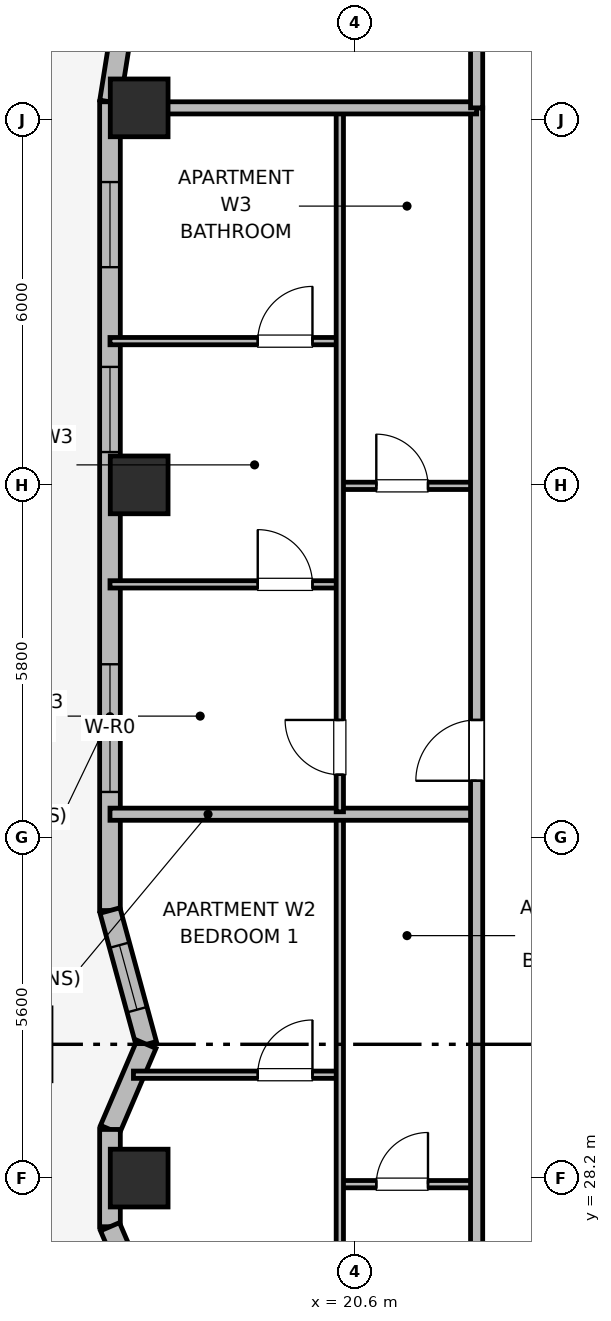
"""IFC4 building model, lengths in metres.
Left out: names, types, materials, properties, quantities, classifications, styles, units other than length and angle.
Written with IfcOpenShell. Run it as: python <this file> out.ifc"""

import sys

from ifc_helpers import new_model, si_unit, direction, frame, frame_2d, origin, origin_2d, place, context, subcontext, project, spatial, rectangle, extrude, element, fill, save


model = new_model("IFC4")
c1 = context("Model", 3, precision=1e-05, world=origin(), true_north=direction((0.0, 1.0)))
c2 = subcontext(c1, "Body", "Model", "MODEL_VIEW")
j1 = project(units=[si_unit("LENGTHUNIT", "METRE"), si_unit("PLANEANGLEUNIT", "RADIAN")], contexts=[c1])
p1 = place(None, origin())
s1 = spatial("IfcSite", under=j1, at=p1, CompositionType="ELEMENT")
p2 = place(p1, origin())
s2 = spatial("IfcBuilding", under=s1, at=p2, CompositionType="ELEMENT")
p3 = place(p2, frame((0.0, 0.0, 143.6)))
s3 = spatial("IfcBuildingStorey", under=s2, at=p3, CompositionType="ELEMENT", Elevation=143.6)
for number, where, z_axis, x_axis in (
    (1, (17.05, 28.2, 0.0), (0.0, 0.0, 1.0), (1.0, 0.0, 0.0)),
    (2, (17.05, 39.6, 0.0), (0.0, 0.0, 1.0), (1.0, 0.0, 0.0)),
    (3, (17.05, 45.8, 0.0), (0.0, 0.0, 1.0), (1.0, 0.0, 0.0)),
):
    element("IfcColumn", number, at=place(p3, frame(where, z_axis=z_axis, x_axis=x_axis)), inside=s3, PredefinedType="COLUMN", context=c2, shape_type="SweptSolid", body=[
        extrude(rectangle(XDim=0.95, YDim=0.95, at=origin_2d()), origin(), (0.0, 0.0, 1.0), 4.2),
    ])
p4 = place(p3, frame((16.748, 47.022, 0.0), z_axis=(0.0, 0.0, 1.0), x_axis=(-0.156481329164, -0.987680916907, 0.0)))
e4 = element("IfcWall", 4, at=p4, inside=s3, PredefinedType="SOLIDWALL", context=c2, shape_type="SweptSolid", body=[
    extrude(rectangle(XDim=1.136, YDim=0.34, at=frame_2d((0.568, 0.0))), origin(), (0.0, 0.0, 1.0), 3.22),
])
p5 = place(p3, frame((16.57, 45.9, 0.0), z_axis=(0.0, 0.0, 1.0), x_axis=(0.0, -1.0, 0.0)))
e5 = element("IfcWall", 5, at=p5, inside=s3, PredefinedType="SOLIDWALL", context=c2, shape_type="SweptSolid", body=[
    extrude(rectangle(XDim=13.3, YDim=0.34, at=frame_2d((6.65, 0.0))), origin(), (0.0, 0.0, 1.0), 3.22),
])
p6 = place(p5, frame((1.32, 0.0, 0.85)))
e6 = element("IfcOpeningElement", 6, at=p6, cuts=e5, PredefinedType="OPENING", context=c2, shape_type="SweptSolid", body=[
    extrude(rectangle(XDim=1.4, YDim=1.85, at=frame_2d((0.7, 0.925))), frame((0.0, 0.18, 0.0), z_axis=(0.0, -1.0, 0.0), x_axis=(1.0, 0.0, 0.0)), (0.0, 0.0, 1.0), 0.36),
])
p7 = place(p5, frame((4.36, 0.0, 0.85)))
e7 = element("IfcOpeningElement", 7, at=p7, cuts=e5, PredefinedType="OPENING", context=c2, shape_type="SweptSolid", body=[
    extrude(rectangle(XDim=1.4, YDim=1.85, at=frame_2d((0.7, 0.925))), frame((0.0, 0.18, 0.0), z_axis=(0.0, -1.0, 0.0), x_axis=(1.0, 0.0, 0.0)), (0.0, 0.0, 1.0), 0.36),
])
p8 = place(p5, frame((9.25, 0.0, 0.8)))
e8 = element("IfcOpeningElement", 8, at=p8, cuts=e5, PredefinedType="OPENING", context=c2, shape_type="SweptSolid", body=[
    extrude(rectangle(XDim=2.1, YDim=1.9, at=frame_2d((1.05, 0.95))), frame((0.0, 0.18, 0.0), z_axis=(0.0, -1.0, 0.0), x_axis=(1.0, 0.0, 0.0)), (0.0, 0.0, 1.0), 0.36),
])
p9 = place(p3, frame((16.57, 32.6, 0.0), z_axis=(0.0, 0.0, 1.0), x_axis=(0.263035877812, -0.96478605244, 0.0)))
e9 = element("IfcWall", 9, at=p9, inside=s3, PredefinedType="SOLIDWALL", context=c2, shape_type="SweptSolid", body=[
    extrude(rectangle(XDim=2.281, YDim=0.34, at=frame_2d((1.14, 0.0))), origin(), (0.0, 0.0, 1.0), 3.22),
])
p10 = place(p9, frame((0.59, 0.0, 0.95)))
e10 = element("IfcOpeningElement", 10, at=p10, cuts=e9, PredefinedType="OPENING", context=c2, shape_type="SweptSolid", body=[
    extrude(rectangle(XDim=1.1, YDim=1.65, at=frame_2d((0.55, 0.825))), frame((0.0, 0.18, 0.0), z_axis=(0.0, -1.0, 0.0), x_axis=(1.0, 0.0, 0.0)), (0.0, 0.0, 1.0), 0.36),
])
p11 = place(p3, frame((17.17, 30.4, 0.0), z_axis=(0.0, 0.0, 1.0), x_axis=(-0.393861257526, -0.919169902586, 0.0)))
e11 = element("IfcWall", 11, at=p11, inside=s3, PredefinedType="SOLIDWALL", context=c2, shape_type="SweptSolid", body=[
    extrude(rectangle(XDim=1.523, YDim=0.34, at=frame_2d((0.761, 0.0))), origin(), (0.0, 0.0, 1.0), 3.22),
])
p12 = place(p3, frame((16.57, 29.0, 0.0), z_axis=(0.0, 0.0, 1.0), x_axis=(0.0, -1.0, 0.0)))
e12 = element("IfcWall", 12, at=p12, inside=s3, PredefinedType="SOLIDWALL", context=c2, shape_type="SweptSolid", body=[
    extrude(rectangle(XDim=1.6, YDim=0.34, at=frame_2d((0.8, 0.0))), origin(), (0.0, 0.0, 1.0), 3.22),
])
p13 = place(p3, frame((16.57, 27.4, 0.0), z_axis=(0.0, 0.0, 1.0), x_axis=(0.393861257526, -0.919169902586, 0.0)))
e13 = element("IfcWall", 13, at=p13, inside=s3, PredefinedType="SOLIDWALL", context=c2, shape_type="SweptSolid", body=[
    extrude(rectangle(XDim=1.523, YDim=0.34, at=frame_2d((0.761, 0.0))), origin(), (0.0, 0.0, 1.0), 3.22),
])
p14 = place(p3, frame((20.35, 28.1, 0.0), z_axis=(0.0, 0.0, 1.0), x_axis=(1.0, 0.0, 0.0)))
e14 = element("IfcWall", 14, at=p14, inside=s3, PredefinedType="PARTITIONING", context=c2, shape_type="SweptSolid", body=[
    extrude(rectangle(XDim=2.25, YDim=0.12, at=frame_2d((1.125, 0.0))), origin(), (0.0, 0.0, 1.0), 3.05),
])
p15 = place(p14, frame((0.6, 0.0, 0.0)))
e15 = element("IfcOpeningElement", 15, at=p15, cuts=e14, PredefinedType="OPENING", context=c2, shape_type="SweptSolid", body=[
    extrude(rectangle(XDim=0.85, YDim=2.1, at=frame_2d((0.425, 1.05))), frame((0.0, 0.07, 0.0), z_axis=(0.0, -1.0, 0.0), x_axis=(1.0, 0.0, 0.0)), (0.0, 0.0, 1.0), 0.14),
])
p16 = place(p3, frame((16.956, 29.9, 0.0), z_axis=(0.0, 0.0, 1.0), x_axis=(1.0, 0.0, 0.0)))
e16 = element("IfcWall", 16, at=p16, inside=s3, PredefinedType="PARTITIONING", context=c2, shape_type="SweptSolid", body=[
    extrude(rectangle(XDim=3.394, YDim=0.12, at=frame_2d((1.697, 0.0))), origin(), (0.0, 0.0, 1.0), 3.05),
])
p17 = place(p16, frame((2.044, 0.0, 0.0)))
e17 = element("IfcOpeningElement", 17, at=p17, cuts=e16, PredefinedType="OPENING", context=c2, shape_type="SweptSolid", body=[
    extrude(rectangle(XDim=0.9, YDim=2.1, at=frame_2d((0.45, 1.05))), frame((0.0, 0.07, 0.0), z_axis=(0.0, -1.0, 0.0), x_axis=(1.0, 0.0, 0.0)), (0.0, 0.0, 1.0), 0.14),
])
p18 = place(p3, frame((20.35, 22.74, 0.0), z_axis=(0.0, 0.0, 1.0), x_axis=(0.0, 1.0, 0.0)))
e18 = element("IfcWall", 18, at=p18, inside=s3, PredefinedType="PARTITIONING", context=c2, shape_type="SweptSolid", body=[
    extrude(rectangle(XDim=11.404, YDim=0.12, at=frame_2d((5.702, 0.0))), origin(), (0.0, 0.0, 1.0), 3.05),
])
p19 = place(p18, frame((0.61, 0.0, 0.0)))
e19 = element("IfcOpeningElement", 19, at=p19, cuts=e18, PredefinedType="OPENING", context=c2, shape_type="SweptSolid", body=[
    extrude(rectangle(XDim=0.9, YDim=2.1, at=frame_2d((0.45, 1.05))), frame((0.0, 0.07, 0.0), z_axis=(0.0, -1.0, 0.0), x_axis=(1.0, 0.0, 0.0)), (0.0, 0.0, 1.0), 0.14),
])
p20 = place(p3, frame((16.57, 34.184, 0.0), z_axis=(0.0, 0.0, 1.0), x_axis=(1.0, 0.0, 0.0)))
e20 = element("IfcWall", 20, at=p20, inside=s3, PredefinedType="PARTITIONING", context=c2, shape_type="SweptSolid", body=[
    extrude(rectangle(XDim=6.03, YDim=0.2, at=frame_2d((3.015, 0.0))), origin(), (0.0, 0.0, 1.0), 3.05),
])
p21 = place(p3, frame((20.35, 39.584, 0.0), z_axis=(0.0, 0.0, 1.0), x_axis=(1.0, 0.0, 0.0)))
e21 = element("IfcWall", 21, at=p21, inside=s3, PredefinedType="PARTITIONING", context=c2, shape_type="SweptSolid", body=[
    extrude(rectangle(XDim=2.25, YDim=0.12, at=frame_2d((1.125, 0.0))), origin(), (0.0, 0.0, 1.0), 3.05),
])
p22 = place(p21, frame((0.6, 0.0, 0.0)))
e22 = element("IfcOpeningElement", 22, at=p22, cuts=e21, PredefinedType="OPENING", context=c2, shape_type="SweptSolid", body=[
    extrude(rectangle(XDim=0.85, YDim=2.1, at=frame_2d((0.425, 1.05))), frame((0.0, 0.07, 0.0), z_axis=(0.0, -1.0, 0.0), x_axis=(1.0, 0.0, 0.0)), (0.0, 0.0, 1.0), 0.14),
])
p23 = place(p3, frame((16.57, 37.964, 0.0), z_axis=(0.0, 0.0, 1.0), x_axis=(1.0, 0.0, 0.0)))
e23 = element("IfcWall", 23, at=p23, inside=s3, PredefinedType="PARTITIONING", context=c2, shape_type="SweptSolid", body=[
    extrude(rectangle(XDim=3.78, YDim=0.12, at=frame_2d((1.89, 0.0))), origin(), (0.0, 0.0, 1.0), 3.05),
])
p24 = place(p23, frame((2.43, 0.0, 0.0)))
e24 = element("IfcOpeningElement", 24, at=p24, cuts=e23, PredefinedType="OPENING", context=c2, shape_type="SweptSolid", body=[
    extrude(rectangle(XDim=0.9, YDim=2.1, at=frame_2d((0.45, 1.05))), frame((0.0, 0.07, 0.0), z_axis=(0.0, -1.0, 0.0), x_axis=(1.0, 0.0, 0.0)), (0.0, 0.0, 1.0), 0.14),
])
p25 = place(p3, frame((16.57, 41.964, 0.0), z_axis=(0.0, 0.0, 1.0), x_axis=(1.0, 0.0, 0.0)))
e25 = element("IfcWall", 25, at=p25, inside=s3, PredefinedType="PARTITIONING", context=c2, shape_type="SweptSolid", body=[
    extrude(rectangle(XDim=3.78, YDim=0.12, at=frame_2d((1.89, 0.0))), origin(), (0.0, 0.0, 1.0), 3.05),
])
p26 = place(p25, frame((2.43, 0.0, 0.0)))
e26 = element("IfcOpeningElement", 26, at=p26, cuts=e25, PredefinedType="OPENING", context=c2, shape_type="SweptSolid", body=[
    extrude(rectangle(XDim=0.9, YDim=2.1, at=frame_2d((0.45, 1.05))), frame((0.0, 0.07, 0.0), z_axis=(0.0, -1.0, 0.0), x_axis=(1.0, 0.0, 0.0)), (0.0, 0.0, 1.0), 0.14),
])
p27 = place(p3, frame((20.35, 34.224, 0.0), z_axis=(0.0, 0.0, 1.0), x_axis=(0.0, 1.0, 0.0)))
e27 = element("IfcWall", 27, at=p27, inside=s3, PredefinedType="PARTITIONING", context=c2, shape_type="SweptSolid", body=[
    extrude(rectangle(XDim=11.536, YDim=0.12, at=frame_2d((5.768, 0.0))), origin(), (0.0, 0.0, 1.0), 3.05),
])
p28 = place(p27, frame((0.61, 0.0, 0.0)))
e28 = element("IfcOpeningElement", 28, at=p28, cuts=e27, PredefinedType="OPENING", context=c2, shape_type="SweptSolid", body=[
    extrude(rectangle(XDim=0.9, YDim=2.1, at=frame_2d((0.45, 1.05))), frame((0.0, 0.07, 0.0), z_axis=(0.0, -1.0, 0.0), x_axis=(1.0, 0.0, 0.0)), (0.0, 0.0, 1.0), 0.14),
])
p29 = place(p3, frame((22.6, 10.6, 0.0), z_axis=(0.0, 0.0, 1.0), x_axis=(0.0, 1.0, 0.0)))
e29 = element("IfcWall", 29, at=p29, inside=s3, PredefinedType="PARTITIONING", context=c2, shape_type="SweptSolid", body=[
    extrude(rectangle(XDim=35.2, YDim=0.2, at=frame_2d((17.6, 0.0))), origin(), (0.0, 0.0, 1.0), 3.05),
])
p30 = place(p29, frame((2.65, 0.0, 0.0)))
e30 = element("IfcOpeningElement", 30, at=p30, cuts=e29, PredefinedType="OPENING", context=c2, shape_type="SweptSolid", body=[
    extrude(rectangle(XDim=1.0, YDim=2.15, at=frame_2d((0.5, 1.075))), frame((0.0, 0.11, 0.0), z_axis=(0.0, -1.0, 0.0), x_axis=(1.0, 0.0, 0.0)), (0.0, 0.0, 1.0), 0.22),
])
p31 = place(p29, frame((12.65, 0.0, 0.0)))
e31 = element("IfcOpeningElement", 31, at=p31, cuts=e29, PredefinedType="OPENING", context=c2, shape_type="SweptSolid", body=[
    extrude(rectangle(XDim=1.0, YDim=2.15, at=frame_2d((0.5, 1.075))), frame((0.0, 0.11, 0.0), z_axis=(0.0, -1.0, 0.0), x_axis=(1.0, 0.0, 0.0)), (0.0, 0.0, 1.0), 0.22),
])
p32 = place(p29, frame((24.134, 0.0, 0.0)))
e32 = element("IfcOpeningElement", 32, at=p32, cuts=e29, PredefinedType="OPENING", context=c2, shape_type="SweptSolid", body=[
    extrude(rectangle(XDim=1.0, YDim=2.15, at=frame_2d((0.5, 1.075))), frame((0.0, 0.11, 0.0), z_axis=(0.0, -1.0, 0.0), x_axis=(1.0, 0.0, 0.0)), (0.0, 0.0, 1.0), 0.22),
])
p33 = place(p3, frame((16.99, 45.8, 0.0), z_axis=(0.0, 0.0, 1.0), x_axis=(1.0, 0.0, 0.0)))
e33 = element("IfcWall", 33, at=p33, inside=s3, PredefinedType="PARTITIONING", context=c2, shape_type="SweptSolid", body=[
    extrude(rectangle(XDim=5.61, YDim=0.2, at=frame_2d((2.805, 0.0))), origin(), (0.0, 0.0, 1.0), 3.05),
])
p34 = place(p3, frame((22.6, 45.8, 0.0), z_axis=(0.0, 0.0, 1.0), x_axis=(0.0, 1.0, 0.0)))
e34 = element("IfcWall", 34, at=p34, inside=s3, PredefinedType="PARTITIONING", context=c2, shape_type="SweptSolid", body=[
    extrude(rectangle(XDim=3.73, YDim=0.2, at=frame_2d((1.865, 0.0))), origin(), (0.0, 0.0, 1.0), 3.05),
])
p35 = place(p6, origin())
e35 = element("IfcWindow", 35, at=p35, inside=s3, PartitioningType="SINGLE_PANEL", PredefinedType="WINDOW", context=c2, shape_type="SweptSolid", body=[
    extrude(rectangle(XDim=1.4, YDim=1.85, at=frame_2d((0.7, 0.925))), frame((0.0, 0.03, 0.0), z_axis=(0.0, -1.0, 0.0), x_axis=(1.0, 0.0, 0.0)), (0.0, 0.0, 1.0), 0.06),
])
fill(e6, e35)
p36 = place(p7, origin())
e36 = element("IfcWindow", 36, at=p36, inside=s3, PartitioningType="SINGLE_PANEL", PredefinedType="WINDOW", context=c2, shape_type="SweptSolid", body=[
    extrude(rectangle(XDim=1.4, YDim=1.85, at=frame_2d((0.7, 0.925))), frame((0.0, 0.03, 0.0), z_axis=(0.0, -1.0, 0.0), x_axis=(1.0, 0.0, 0.0)), (0.0, 0.0, 1.0), 0.06),
])
fill(e7, e36)
p37 = place(p8, origin())
e37 = element("IfcWindow", 37, at=p37, inside=s3, PartitioningType="SINGLE_PANEL", PredefinedType="WINDOW", context=c2, shape_type="SweptSolid", body=[
    extrude(rectangle(XDim=2.1, YDim=1.9, at=frame_2d((1.05, 0.95))), frame((0.0, 0.03, 0.0), z_axis=(0.0, -1.0, 0.0), x_axis=(1.0, 0.0, 0.0)), (0.0, 0.0, 1.0), 0.06),
])
fill(e8, e37)
p38 = place(p10, origin())
e38 = element("IfcWindow", 38, at=p38, inside=s3, PartitioningType="SINGLE_PANEL", PredefinedType="WINDOW", context=c2, shape_type="SweptSolid", body=[
    extrude(rectangle(XDim=1.1, YDim=1.65, at=frame_2d((0.55, 0.825))), frame((0.0, 0.03, 0.0), z_axis=(0.0, -1.0, 0.0), x_axis=(1.0, 0.0, 0.0)), (0.0, 0.0, 1.0), 0.06),
])
fill(e10, e38)
p39 = place(p15, origin())
e39 = element("IfcDoor", 39, at=p39, inside=s3, OperationType="SINGLE_SWING_RIGHT", PredefinedType="DOOR", context=c2, shape_type="SweptSolid", body=[
    extrude(rectangle(XDim=0.85, YDim=2.1, at=frame_2d((0.425, 1.05))), frame((0.0, 0.025, 0.0), z_axis=(0.0, -1.0, 0.0), x_axis=(1.0, 0.0, 0.0)), (0.0, 0.0, 1.0), 0.05),
])
fill(e15, e39)
p40 = place(p17, origin())
e40 = element("IfcDoor", 40, at=p40, inside=s3, OperationType="SINGLE_SWING_RIGHT", PredefinedType="DOOR", context=c2, shape_type="SweptSolid", body=[
    extrude(rectangle(XDim=0.9, YDim=2.1, at=frame_2d((0.45, 1.05))), frame((0.0, 0.025, 0.0), z_axis=(0.0, -1.0, 0.0), x_axis=(1.0, 0.0, 0.0)), (0.0, 0.0, 1.0), 0.05),
])
fill(e17, e40)
p41 = place(p22, origin())
e41 = element("IfcDoor", 41, at=p41, inside=s3, OperationType="SINGLE_SWING_LEFT", PredefinedType="DOOR", context=c2, shape_type="SweptSolid", body=[
    extrude(rectangle(XDim=0.85, YDim=2.1, at=frame_2d((0.425, 1.05))), frame((0.0, 0.025, 0.0), z_axis=(0.0, -1.0, 0.0), x_axis=(1.0, 0.0, 0.0)), (0.0, 0.0, 1.0), 0.05),
])
fill(e22, e41)
p42 = place(p24, origin())
e42 = element("IfcDoor", 42, at=p42, inside=s3, OperationType="SINGLE_SWING_LEFT", PredefinedType="DOOR", context=c2, shape_type="SweptSolid", body=[
    extrude(rectangle(XDim=0.9, YDim=2.1, at=frame_2d((0.45, 1.05))), frame((0.0, 0.025, 0.0), z_axis=(0.0, -1.0, 0.0), x_axis=(1.0, 0.0, 0.0)), (0.0, 0.0, 1.0), 0.05),
])
fill(e24, e42)
p43 = place(p26, origin())
e43 = element("IfcDoor", 43, at=p43, inside=s3, OperationType="SINGLE_SWING_RIGHT", PredefinedType="DOOR", context=c2, shape_type="SweptSolid", body=[
    extrude(rectangle(XDim=0.9, YDim=2.1, at=frame_2d((0.45, 1.05))), frame((0.0, 0.025, 0.0), z_axis=(0.0, -1.0, 0.0), x_axis=(1.0, 0.0, 0.0)), (0.0, 0.0, 1.0), 0.05),
])
fill(e26, e43)
p44 = place(p28, origin())
e44 = element("IfcDoor", 44, at=p44, inside=s3, OperationType="SINGLE_SWING_RIGHT", PredefinedType="DOOR", context=c2, shape_type="SweptSolid", body=[
    extrude(rectangle(XDim=0.9, YDim=2.1, at=frame_2d((0.45, 1.05))), frame((0.0, 0.025, 0.0), z_axis=(0.0, -1.0, 0.0), x_axis=(1.0, 0.0, 0.0)), (0.0, 0.0, 1.0), 0.05),
])
fill(e28, e44)
p45 = place(p32, origin())
e45 = element("IfcDoor", 45, at=p45, inside=s3, OperationType="SINGLE_SWING_LEFT", PredefinedType="DOOR", context=c2, shape_type="SweptSolid", body=[
    extrude(rectangle(XDim=1.0, YDim=2.15, at=frame_2d((0.5, 1.075))), frame((0.0, 0.025, 0.0), z_axis=(0.0, -1.0, 0.0), x_axis=(1.0, 0.0, 0.0)), (0.0, 0.0, 1.0), 0.05),
])
fill(e32, e45)
save(model, sys.argv[1])
